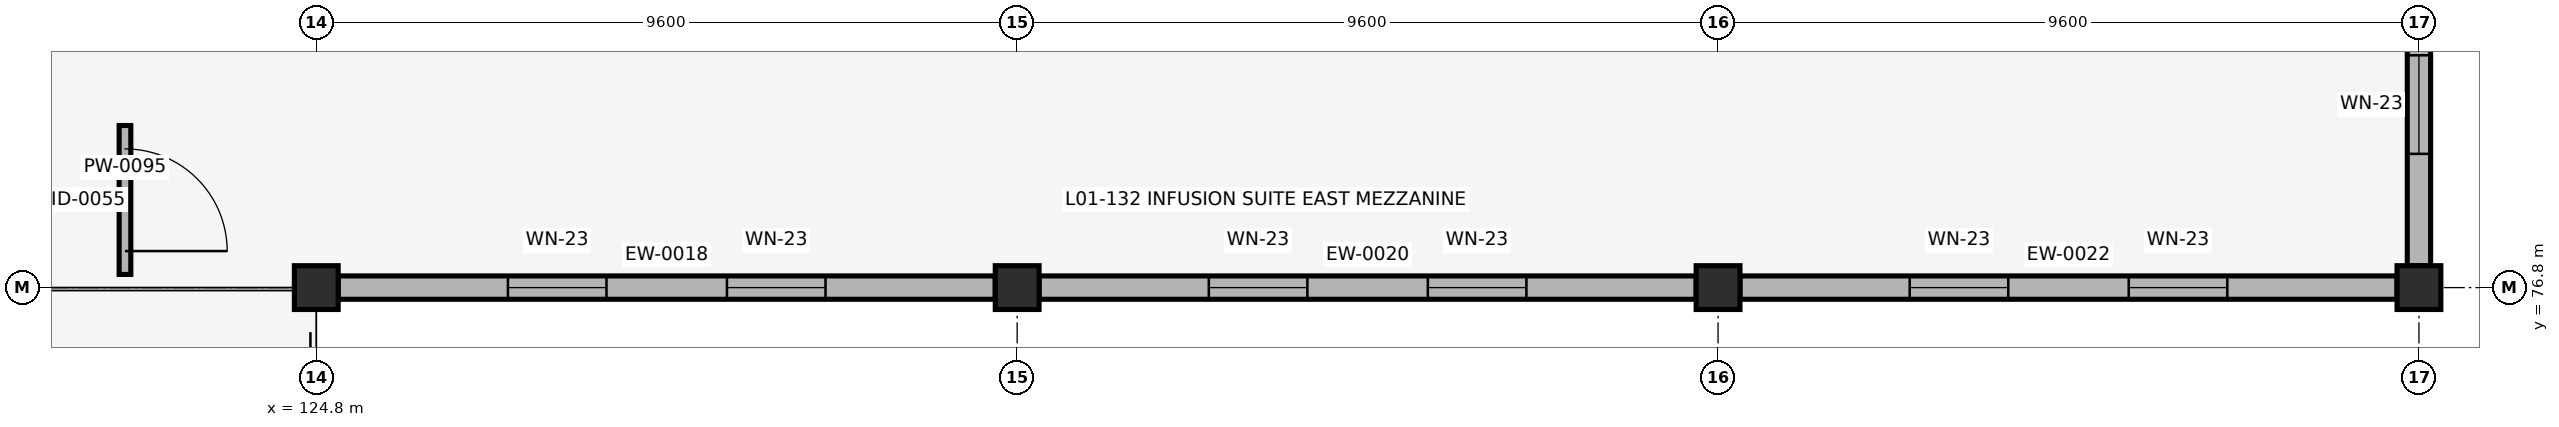
"""IFC4 building model, lengths in metres.
Left out: names, types, materials, properties, quantities, classifications, styles, units other than length and angle.
Written with IfcOpenShell. Run it as: python <this file> out.ifc"""

import sys

from ifc_helpers import new_model, si_unit, direction, frame, frame_2d, origin, origin_2d, place, context, subcontext, project, spatial, rectangle, extrude, element, fill, save


model = new_model("IFC4")
c1 = context("Model", 3, precision=1e-05, world=origin(), true_north=direction((0.0, 1.0)))
c2 = subcontext(c1, "Body", "Model", "MODEL_VIEW")
j1 = project(units=[si_unit("LENGTHUNIT", "METRE"), si_unit("PLANEANGLEUNIT", "RADIAN")], contexts=[c1])
p1 = place(None, origin())
s1 = spatial("IfcSite", under=j1, at=p1, CompositionType="ELEMENT")
p2 = place(p1, origin())
s2 = spatial("IfcBuilding", under=s1, at=p2, CompositionType="ELEMENT")
p3 = place(p2, frame((0.0, 0.0, 4.42)))
s3 = spatial("IfcBuildingStorey", under=s2, at=p3, CompositionType="ELEMENT", Elevation=4.42)
for number, where, z_axis, x_axis in (
    (1, (124.8, 76.8, 0.0), (0.0, 0.0, 1.0), (1.0, 0.0, 0.0)),
    (2, (134.4, 76.8, 0.0), (0.0, 0.0, 1.0), (1.0, 0.0, 0.0)),
    (3, (144.0, 76.8, 0.0), (0.0, 0.0, 1.0), (1.0, 0.0, 0.0)),
    (4, (153.6, 76.8, 0.0), (0.0, 0.0, 1.0), (1.0, 0.0, 0.0)),
):
    element("IfcColumn", number, at=place(p3, frame(where, z_axis=z_axis, x_axis=x_axis)), inside=s3, PredefinedType="COLUMN", context=c2, shape_type="SweptSolid", body=[
        extrude(rectangle(XDim=0.6, YDim=0.6, at=origin_2d()), origin(), (0.0, 0.0, 1.0), 4.28),
    ])
p4 = place(p3, frame((125.1, 76.8, 0.0), z_axis=(0.0, 0.0, 1.0), x_axis=(1.0, 0.0, 0.0)))
e5 = element("IfcWall", 5, at=p4, inside=s3, PredefinedType="SOLIDWALL", context=c2, shape_type="SweptSolid", body=[
    extrude(rectangle(XDim=9.0, YDim=0.32, at=frame_2d((4.5, 0.0))), origin(), (0.0, 0.0, 1.0), 3.63),
])
p5 = place(p4, frame((2.325, 0.0, 0.72)))
e6 = element("IfcOpeningElement", 6, at=p5, cuts=e5, PredefinedType="OPENING", context=c2, shape_type="SweptSolid", body=[
    extrude(rectangle(XDim=1.35, YDim=2.42, at=frame_2d((0.675, 1.21))), frame((0.0, 0.17, 0.0), z_axis=(0.0, -1.0, 0.0), x_axis=(1.0, 0.0, 0.0)), (0.0, 0.0, 1.0), 0.34),
])
p6 = place(p4, frame((5.325, 0.0, 0.72)))
e7 = element("IfcOpeningElement", 7, at=p6, cuts=e5, PredefinedType="OPENING", context=c2, shape_type="SweptSolid", body=[
    extrude(rectangle(XDim=1.35, YDim=2.42, at=frame_2d((0.675, 1.21))), frame((0.0, 0.17, 0.0), z_axis=(0.0, -1.0, 0.0), x_axis=(1.0, 0.0, 0.0)), (0.0, 0.0, 1.0), 0.34),
])
p7 = place(p3, frame((134.7, 76.8, 0.0), z_axis=(0.0, 0.0, 1.0), x_axis=(1.0, 0.0, 0.0)))
e8 = element("IfcWall", 8, at=p7, inside=s3, PredefinedType="SOLIDWALL", context=c2, shape_type="SweptSolid", body=[
    extrude(rectangle(XDim=9.0, YDim=0.32, at=frame_2d((4.5, 0.0))), origin(), (0.0, 0.0, 1.0), 3.63),
])
p8 = place(p7, frame((2.325, 0.0, 0.72)))
e9 = element("IfcOpeningElement", 9, at=p8, cuts=e8, PredefinedType="OPENING", context=c2, shape_type="SweptSolid", body=[
    extrude(rectangle(XDim=1.35, YDim=2.42, at=frame_2d((0.675, 1.21))), frame((0.0, 0.17, 0.0), z_axis=(0.0, -1.0, 0.0), x_axis=(1.0, 0.0, 0.0)), (0.0, 0.0, 1.0), 0.34),
])
p9 = place(p7, frame((5.325, 0.0, 0.72)))
e10 = element("IfcOpeningElement", 10, at=p9, cuts=e8, PredefinedType="OPENING", context=c2, shape_type="SweptSolid", body=[
    extrude(rectangle(XDim=1.35, YDim=2.42, at=frame_2d((0.675, 1.21))), frame((0.0, 0.17, 0.0), z_axis=(0.0, -1.0, 0.0), x_axis=(1.0, 0.0, 0.0)), (0.0, 0.0, 1.0), 0.34),
])
p10 = place(p3, frame((144.3, 76.8, 0.0), z_axis=(0.0, 0.0, 1.0), x_axis=(1.0, 0.0, 0.0)))
e11 = element("IfcWall", 11, at=p10, inside=s3, PredefinedType="SOLIDWALL", context=c2, shape_type="SweptSolid", body=[
    extrude(rectangle(XDim=9.0, YDim=0.32, at=frame_2d((4.5, 0.0))), origin(), (0.0, 0.0, 1.0), 3.63),
])
p11 = place(p10, frame((2.325, 0.0, 0.72)))
e12 = element("IfcOpeningElement", 12, at=p11, cuts=e11, PredefinedType="OPENING", context=c2, shape_type="SweptSolid", body=[
    extrude(rectangle(XDim=1.35, YDim=2.42, at=frame_2d((0.675, 1.21))), frame((0.0, 0.17, 0.0), z_axis=(0.0, -1.0, 0.0), x_axis=(1.0, 0.0, 0.0)), (0.0, 0.0, 1.0), 0.34),
])
p12 = place(p10, frame((5.325, 0.0, 0.72)))
e13 = element("IfcOpeningElement", 13, at=p12, cuts=e11, PredefinedType="OPENING", context=c2, shape_type="SweptSolid", body=[
    extrude(rectangle(XDim=1.35, YDim=2.42, at=frame_2d((0.675, 1.21))), frame((0.0, 0.17, 0.0), z_axis=(0.0, -1.0, 0.0), x_axis=(1.0, 0.0, 0.0)), (0.0, 0.0, 1.0), 0.34),
])
p13 = place(p3, frame((153.6, 77.1, 0.0), z_axis=(0.0, 0.0, 1.0), x_axis=(0.0, 1.0, 0.0)))
e14 = element("IfcWall", 14, at=p13, inside=s3, PredefinedType="SOLIDWALL", context=c2, shape_type="SweptSolid", body=[
    extrude(rectangle(XDim=6.62, YDim=0.32, at=frame_2d((3.31, 0.0))), origin(), (0.0, 0.0, 1.0), 3.63),
])
p14 = place(p13, frame((1.532, 0.0, 0.72)))
e15 = element("IfcOpeningElement", 15, at=p14, cuts=e14, PredefinedType="OPENING", context=c2, shape_type="SweptSolid", body=[
    extrude(rectangle(XDim=1.35, YDim=2.42, at=frame_2d((0.675, 1.21))), frame((0.0, 0.17, 0.0), z_axis=(0.0, -1.0, 0.0), x_axis=(1.0, 0.0, 0.0)), (0.0, 0.0, 1.0), 0.34),
])
p15 = place(p13, frame((3.738, 0.0, 0.72)))
e16 = element("IfcOpeningElement", 16, at=p15, cuts=e14, PredefinedType="OPENING", context=c2, shape_type="SweptSolid", body=[
    extrude(rectangle(XDim=1.35, YDim=2.42, at=frame_2d((0.675, 1.21))), frame((0.0, 0.17, 0.0), z_axis=(0.0, -1.0, 0.0), x_axis=(1.0, 0.0, 0.0)), (0.0, 0.0, 1.0), 0.34),
])
p16 = place(p3, frame((122.18, 76.98, 0.0), z_axis=(0.0, 0.0, 1.0), x_axis=(0.0, 1.0, 0.0)))
e17 = element("IfcWall", 17, at=p16, inside=s3, PredefinedType="PARTITIONING", context=c2, shape_type="SweptSolid", body=[
    extrude(rectangle(XDim=2.04, YDim=0.16, at=frame_2d((1.02, 0.0))), origin(), (0.0, 0.0, 1.0), 3.12),
])
p17 = place(p16, frame((0.32, 0.0, 0.0)))
e18 = element("IfcOpeningElement", 18, at=p17, cuts=e17, PredefinedType="OPENING", context=c2, shape_type="SweptSolid", body=[
    extrude(rectangle(XDim=1.4, YDim=2.12, at=frame_2d((0.7, 1.06))), frame((0.0, 0.09, 0.0), z_axis=(0.0, -1.0, 0.0), x_axis=(1.0, 0.0, 0.0)), (0.0, 0.0, 1.0), 0.18),
])
p18 = place(p5, origin())
e19 = element("IfcWindow", 19, at=p18, inside=s3, PartitioningType="SINGLE_PANEL", PredefinedType="WINDOW", context=c2, shape_type="SweptSolid", body=[
    extrude(rectangle(XDim=1.35, YDim=2.42, at=frame_2d((0.675, 1.21))), frame((0.0, 0.03, 0.0), z_axis=(0.0, -1.0, 0.0), x_axis=(1.0, 0.0, 0.0)), (0.0, 0.0, 1.0), 0.06),
])
fill(e6, e19)
p19 = place(p6, origin())
e20 = element("IfcWindow", 20, at=p19, inside=s3, PartitioningType="SINGLE_PANEL", PredefinedType="WINDOW", context=c2, shape_type="SweptSolid", body=[
    extrude(rectangle(XDim=1.35, YDim=2.42, at=frame_2d((0.675, 1.21))), frame((0.0, 0.03, 0.0), z_axis=(0.0, -1.0, 0.0), x_axis=(1.0, 0.0, 0.0)), (0.0, 0.0, 1.0), 0.06),
])
fill(e7, e20)
p20 = place(p8, origin())
e21 = element("IfcWindow", 21, at=p20, inside=s3, PartitioningType="SINGLE_PANEL", PredefinedType="WINDOW", context=c2, shape_type="SweptSolid", body=[
    extrude(rectangle(XDim=1.35, YDim=2.42, at=frame_2d((0.675, 1.21))), frame((0.0, 0.03, 0.0), z_axis=(0.0, -1.0, 0.0), x_axis=(1.0, 0.0, 0.0)), (0.0, 0.0, 1.0), 0.06),
])
fill(e9, e21)
p21 = place(p9, origin())
e22 = element("IfcWindow", 22, at=p21, inside=s3, PartitioningType="SINGLE_PANEL", PredefinedType="WINDOW", context=c2, shape_type="SweptSolid", body=[
    extrude(rectangle(XDim=1.35, YDim=2.42, at=frame_2d((0.675, 1.21))), frame((0.0, 0.03, 0.0), z_axis=(0.0, -1.0, 0.0), x_axis=(1.0, 0.0, 0.0)), (0.0, 0.0, 1.0), 0.06),
])
fill(e10, e22)
p22 = place(p11, origin())
e23 = element("IfcWindow", 23, at=p22, inside=s3, PartitioningType="SINGLE_PANEL", PredefinedType="WINDOW", context=c2, shape_type="SweptSolid", body=[
    extrude(rectangle(XDim=1.35, YDim=2.42, at=frame_2d((0.675, 1.21))), frame((0.0, 0.03, 0.0), z_axis=(0.0, -1.0, 0.0), x_axis=(1.0, 0.0, 0.0)), (0.0, 0.0, 1.0), 0.06),
])
fill(e12, e23)
p23 = place(p12, origin())
e24 = element("IfcWindow", 24, at=p23, inside=s3, PartitioningType="SINGLE_PANEL", PredefinedType="WINDOW", context=c2, shape_type="SweptSolid", body=[
    extrude(rectangle(XDim=1.35, YDim=2.42, at=frame_2d((0.675, 1.21))), frame((0.0, 0.03, 0.0), z_axis=(0.0, -1.0, 0.0), x_axis=(1.0, 0.0, 0.0)), (0.0, 0.0, 1.0), 0.06),
])
fill(e13, e24)
p24 = place(p14, origin())
e25 = element("IfcWindow", 25, at=p24, inside=s3, PartitioningType="SINGLE_PANEL", PredefinedType="WINDOW", context=c2, shape_type="SweptSolid", body=[
    extrude(rectangle(XDim=1.35, YDim=2.42, at=frame_2d((0.675, 1.21))), frame((0.0, 0.03, 0.0), z_axis=(0.0, -1.0, 0.0), x_axis=(1.0, 0.0, 0.0)), (0.0, 0.0, 1.0), 0.06),
])
fill(e15, e25)
p25 = place(p17, origin())
e26 = element("IfcDoor", 26, at=p25, inside=s3, OperationType="SINGLE_SWING_RIGHT", PredefinedType="DOOR", context=c2, shape_type="SweptSolid", body=[
    extrude(rectangle(XDim=1.4, YDim=2.12, at=frame_2d((0.7, 1.06))), frame((0.0, 0.025, 0.0), z_axis=(0.0, -1.0, 0.0), x_axis=(1.0, 0.0, 0.0)), (0.0, 0.0, 1.0), 0.05),
])
fill(e18, e26)
save(model, sys.argv[1])
